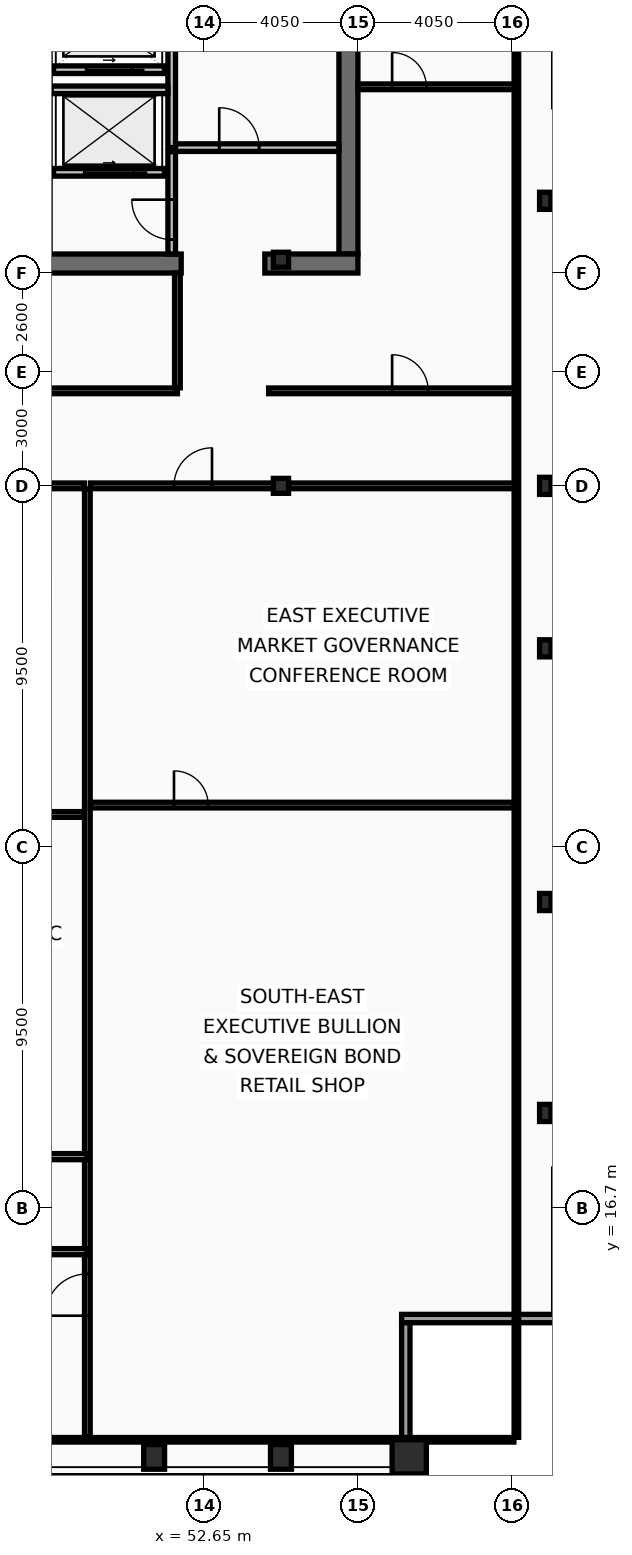
"""IFC4 building model, lengths in metres.
Left out: names, types, materials, properties, quantities, classifications, styles, units other than length and angle.
Written with IfcOpenShell. Run it as: python <this file> out.ifc"""

import sys

from ifc_helpers import new_model, si_unit, direction, frame, frame_2d, origin, origin_2d, place, context, subcontext, project, spatial, rectangle, hollow_rectangle, i_section, extrude, element, fill, save


model = new_model("IFC4")
c1 = context("Model", 3, precision=1e-05, world=origin(), true_north=direction((0.0, 1.0)))
c2 = subcontext(c1, "Body", "Model", "MODEL_VIEW")
j1 = project(units=[si_unit("LENGTHUNIT", "METRE"), si_unit("PLANEANGLEUNIT", "RADIAN")], contexts=[c1])
p1 = place(None, origin())
s1 = spatial("IfcSite", under=j1, at=p1, CompositionType="ELEMENT")
p2 = place(p1, origin())
s2 = spatial("IfcBuilding", under=s1, at=p2, CompositionType="ELEMENT")
p3 = place(p2, frame((0.0, 0.0, 343.4)))
s3 = spatial("IfcBuildingStorey", under=s2, at=p3, CompositionType="ELEMENT", Elevation=343.4)
p4 = place(p3, frame((56.45, 53.2, 0.0), z_axis=(0.0, 0.0, 1.0), x_axis=(0.0, -1.0, 0.0)))
e1 = element("IfcWall", 1, at=p4, inside=s3, PredefinedType="SHEAR", context=c2, shape_type="SweptSolid", body=[
    extrude(rectangle(XDim=11.4, YDim=0.5, at=frame_2d((5.7, 0.0))), origin(), (0.0, 0.0, 1.0), 3.44),
])
p5 = place(p3, frame((52.05, 41.55, 0.0), z_axis=(0.0, 0.0, 1.0), x_axis=(-1.0, 0.0, 0.0)))
e2 = element("IfcWall", 2, at=p5, inside=s3, PredefinedType="SHEAR", context=c2, shape_type="SweptSolid", body=[
    extrude(rectangle(XDim=11.3, YDim=0.5, at=frame_2d((5.65, 0.0))), origin(), (0.0, 0.0, 1.0), 3.44),
])
p6 = place(p3, frame((56.7, 41.55, 0.0), z_axis=(0.0, 0.0, 1.0), x_axis=(-1.0, 0.0, 0.0)))
e3 = element("IfcWall", 3, at=p6, inside=s3, PredefinedType="SHEAR", context=c2, shape_type="SweptSolid", body=[
    extrude(rectangle(XDim=2.45, YDim=0.5, at=frame_2d((1.225, 0.0))), origin(), (0.0, 0.0, 1.0), 3.44),
])
p7 = place(p3, frame((58.05, 10.15, 0.0), z_axis=(0.0, 0.0, 1.0), x_axis=(1.0, 0.0, 0.0)))
e4 = element("IfcColumn", 4, at=p7, inside=s3, PredefinedType="COLUMN", context=c2, shape_type="SweptSolid", body=[
    extrude(hollow_rectangle(XDim=0.9, YDim=0.9, WallThickness=0.05, at=origin_2d()), origin(), (0.0, 0.0, 1.0), 3.6),
])
for number, where, z_axis, x_axis in (
    (5, (51.337, 10.15, 0.0), (0.0, 0.0, 1.0), (1.0, 0.0, 0.0)),
    (6, (54.675, 10.15, 0.0), (0.0, 0.0, 1.0), (1.0, 0.0, 0.0)),
):
    element("IfcColumn", number, at=place(p3, frame(where, z_axis=z_axis, x_axis=x_axis)), inside=s3, PredefinedType="COLUMN", context=c2, shape_type="SweptSolid", body=[
        extrude(hollow_rectangle(XDim=0.55, YDim=0.65, WallThickness=0.04, at=origin_2d()), origin(), (0.0, 0.0, 1.0), 3.6),
    ])
for number, where, z_axis, x_axis in (
    (7, (61.63, 19.2, 0.0), (0.0, 0.0, 1.0), (1.0, 0.0, 0.0)),
    (8, (61.63, 24.75, 0.0), (0.0, 0.0, 1.0), (1.0, 0.0, 0.0)),
    (9, (61.63, 31.425, 0.0), (0.0, 0.0, 1.0), (1.0, 0.0, 0.0)),
    (10, (61.63, 35.7, 0.0), (0.0, 0.0, 1.0), (1.0, 0.0, 0.0)),
    (11, (61.63, 43.2, 0.0), (0.0, 0.0, 1.0), (1.0, 0.0, 0.0)),
):
    element("IfcColumn", number, at=place(p3, frame(where, z_axis=z_axis, x_axis=x_axis)), inside=s3, PredefinedType="COLUMN", context=c2, shape_type="SweptSolid", body=[
        extrude(i_section(OverallWidth=0.3, OverallDepth=0.45, WebThickness=0.014, FlangeThickness=0.026, at=origin_2d()), origin(), (0.0, 0.0, 1.0), 3.6),
    ])
for number, where, z_axis, x_axis in (
    (12, (54.675, 35.7, 0.0), (0.0, 0.0, 1.0), (1.0, 0.0, 0.0)),
    (13, (54.675, 41.65, 0.0), (0.0, 0.0, 1.0), (1.0, 0.0, 0.0)),
):
    element("IfcColumn", number, at=place(p3, frame(where, z_axis=z_axis, x_axis=x_axis)), inside=s3, PredefinedType="COLUMN", context=c2, shape_type="SweptSolid", body=[
        extrude(i_section(OverallWidth=0.399, OverallDepth=0.393, WebThickness=0.023, FlangeThickness=0.037, at=origin_2d()), origin(), (0.0, 0.0, 1.0), 3.6),
    ])
p8 = place(p3, frame((62.07, 13.79, 0.0), z_axis=(0.0, 0.0, 1.0), x_axis=(-1.0, 0.0, 0.0)))
e14 = element("IfcWall", 14, at=p8, inside=s3, PredefinedType="SOLIDWALL", context=c2, shape_type="SweptSolid", body=[
    extrude(rectangle(XDim=4.22, YDim=0.22, at=frame_2d((2.11, 0.0))), origin(), (0.0, 0.0, 1.0), 2.88),
])
p9 = place(p3, frame((57.96, 13.68, 0.0), z_axis=(0.0, 0.0, 1.0), x_axis=(0.0, -1.0, 0.0)))
e15 = element("IfcWall", 15, at=p9, inside=s3, PredefinedType="SOLIDWALL", context=c2, shape_type="SweptSolid", body=[
    extrude(rectangle(XDim=3.91, YDim=0.22, at=frame_2d((1.955, 0.0))), origin(), (0.0, 0.0, 1.0), 2.88),
])
p10 = place(p3, frame((51.61, 43.95, 0.0), z_axis=(0.0, 0.0, 1.0), x_axis=(-1.0, 0.0, 0.0)))
e16 = element("IfcWall", 16, at=p10, inside=s3, PredefinedType="PARTITIONING", context=c2, shape_type="SweptSolid", body=[
    extrude(rectangle(XDim=2.92, YDim=0.2, at=frame_2d((1.46, 0.0))), origin(), (0.0, 0.0, 1.0), 3.44),
])
p11 = place(p10, frame((0.81, 0.0, 0.0)))
e17 = element("IfcOpeningElement", 17, at=p11, cuts=e16, PredefinedType="OPENING", context=c2, shape_type="SweptSolid", body=[
    extrude(rectangle(XDim=1.3, YDim=2.18, at=frame_2d((0.65, 1.09))), frame((0.0, 0.11, 0.0), z_axis=(0.0, -1.0, 0.0), x_axis=(1.0, 0.0, 0.0)), (0.0, 0.0, 1.0), 0.22),
])
p12 = place(p3, frame((51.61, 46.65, 0.0), z_axis=(0.0, 0.0, 1.0), x_axis=(-1.0, 0.0, 0.0)))
e18 = element("IfcWall", 18, at=p12, inside=s3, PredefinedType="PARTITIONING", context=c2, shape_type="SweptSolid", body=[
    extrude(rectangle(XDim=2.92, YDim=0.2, at=frame_2d((1.46, 0.0))), origin(), (0.0, 0.0, 1.0), 3.44),
])
p13 = place(p12, frame((0.86, 0.0, 0.0)))
e19 = element("IfcOpeningElement", 19, at=p13, cuts=e18, PredefinedType="OPENING", context=c2, shape_type="SweptSolid", body=[
    extrude(rectangle(XDim=1.2, YDim=2.18, at=frame_2d((0.6, 1.09))), frame((0.0, 0.11, 0.0), z_axis=(0.0, -1.0, 0.0), x_axis=(1.0, 0.0, 0.0)), (0.0, 0.0, 1.0), 0.22),
])
p14 = place(p3, frame((51.8, 44.6, 0.0), z_axis=(0.0, 0.0, 1.0), x_axis=(0.0, 1.0, 0.0)))
e20 = element("IfcWall", 20, at=p14, inside=s3, PredefinedType="PARTITIONING", context=c2, shape_type="SweptSolid", body=[
    extrude(rectangle(XDim=4.3, YDim=0.2, at=frame_2d((2.15, 0.0))), origin(), (0.0, 0.0, 1.0), 3.44),
])
p15 = place(p3, frame((51.9, 44.6, 0.0), z_axis=(0.0, 0.0, 1.0), x_axis=(1.0, 0.0, 0.0)))
e21 = element("IfcWall", 21, at=p15, inside=s3, PredefinedType="PARTITIONING", context=c2, shape_type="SweptSolid", body=[
    extrude(rectangle(XDim=4.3, YDim=0.2, at=frame_2d((2.15, 0.0))), origin(), (0.0, 0.0, 1.0), 3.44),
])
p16 = place(p15, frame((1.15, 0.0, 0.0)))
e22 = element("IfcOpeningElement", 22, at=p16, cuts=e21, PredefinedType="OPENING", context=c2, shape_type="SweptSolid", body=[
    extrude(rectangle(XDim=1.05, YDim=2.15, at=frame_2d((0.525, 1.075))), frame((0.0, 0.11, 0.0), z_axis=(0.0, -1.0, 0.0), x_axis=(1.0, 0.0, 0.0)), (0.0, 0.0, 1.0), 0.22),
])
p17 = place(p3, frame((48.63, 46.12, 0.0), z_axis=(0.0, 0.0, 1.0), x_axis=(1.0, 0.0, 0.0)))
e23 = element("IfcWall", 23, at=p17, inside=s3, PredefinedType="PARTITIONING", context=c2, shape_type="SweptSolid", body=[
    extrude(rectangle(XDim=3.07, YDim=0.2, at=frame_2d((1.535, 0.0))), origin(), (0.0, 0.0, 1.0), 3.44),
])
p18 = place(p3, frame((51.8, 41.8, 0.0), z_axis=(0.0, 0.0, 1.0), x_axis=(0.0, 1.0, 0.0)))
e24 = element("IfcWall", 24, at=p18, inside=s3, PredefinedType="PARTITIONING", context=c2, shape_type="SweptSolid", body=[
    extrude(rectangle(XDim=2.695, YDim=0.2, at=frame_2d((1.348, 0.0))), origin(), (0.0, 0.0, 1.0), 3.44),
])
p19 = place(p18, frame((0.38, 0.0, 0.0)))
e25 = element("IfcOpeningElement", 25, at=p19, cuts=e24, PredefinedType="OPENING", context=c2, shape_type="SweptSolid", body=[
    extrude(rectangle(XDim=1.05, YDim=2.15, at=frame_2d((0.525, 1.075))), frame((0.0, 0.11, 0.0), z_axis=(0.0, -1.0, 0.0), x_axis=(1.0, 0.0, 0.0)), (0.0, 0.0, 1.0), 0.22),
])
p20 = place(p3, frame((45.55, 38.2, 0.0), z_axis=(0.0, 0.0, 1.0), x_axis=(1.0, 0.0, 0.0)))
e26 = element("IfcWall", 26, at=p20, inside=s3, PredefinedType="PARTITIONING", context=c2, shape_type="SweptSolid", body=[
    extrude(rectangle(XDim=6.4, YDim=0.15, at=frame_2d((3.2, 0.0))), origin(), (0.0, 0.0, 1.0), 2.83),
])
p21 = place(p20, frame((1.1, 0.0, 0.0)))
e27 = element("IfcOpeningElement", 27, at=p21, cuts=e26, PredefinedType="OPENING", context=c2, shape_type="SweptSolid", body=[
    extrude(rectangle(XDim=1.0, YDim=2.05, at=frame_2d((0.5, 1.025))), frame((0.0, 0.085, 0.0), z_axis=(0.0, -1.0, 0.0), x_axis=(1.0, 0.0, 0.0)), (0.0, 0.0, 1.0), 0.17),
])
p22 = place(p3, frame((51.95, 38.28, 0.0), z_axis=(0.0, 0.0, 1.0), x_axis=(0.0, 1.0, 0.0)))
e28 = element("IfcWall", 28, at=p22, inside=s3, PredefinedType="PARTITIONING", context=c2, shape_type="SweptSolid", body=[
    extrude(rectangle(XDim=3.02, YDim=0.15, at=frame_2d((1.51, 0.0))), origin(), (0.0, 0.0, 1.0), 3.44),
])
p23 = place(p3, frame((54.35, 38.2, 0.0), z_axis=(0.0, 0.0, 1.0), x_axis=(1.0, 0.0, 0.0)))
e29 = element("IfcWall", 29, at=p23, inside=s3, PredefinedType="PARTITIONING", context=c2, shape_type="SweptSolid", body=[
    extrude(rectangle(XDim=6.52, YDim=0.15, at=frame_2d((3.26, 0.0))), origin(), (0.0, 0.0, 1.0), 2.83),
])
p24 = place(p23, frame((3.25, 0.0, 0.0)))
e30 = element("IfcOpeningElement", 30, at=p24, cuts=e29, PredefinedType="OPENING", context=c2, shape_type="SweptSolid", body=[
    extrude(rectangle(XDim=0.95, YDim=2.05, at=frame_2d((0.475, 1.025))), frame((0.0, 0.085, 0.0), z_axis=(0.0, -1.0, 0.0), x_axis=(1.0, 0.0, 0.0)), (0.0, 0.0, 1.0), 0.17),
])
p25 = place(p3, frame((56.7, 46.2, 0.0), z_axis=(0.0, 0.0, 1.0), x_axis=(1.0, 0.0, 0.0)))
e31 = element("IfcWall", 31, at=p25, inside=s3, PredefinedType="PARTITIONING", context=c2, shape_type="SweptSolid", body=[
    extrude(rectangle(XDim=4.105, YDim=0.15, at=frame_2d((2.052, 0.0))), origin(), (0.0, 0.0, 1.0), 2.88),
])
p26 = place(p25, frame((0.9, 0.0, 0.0)))
e32 = element("IfcOpeningElement", 32, at=p26, cuts=e31, PredefinedType="OPENING", context=c2, shape_type="SweptSolid", body=[
    extrude(rectangle(XDim=0.9, YDim=2.05, at=frame_2d((0.45, 1.025))), frame((0.0, 0.085, 0.0), z_axis=(0.0, -1.0, 0.0), x_axis=(1.0, 0.0, 0.0)), (0.0, 0.0, 1.0), 0.17),
])
p27 = place(p3, frame((49.58, 10.665, 0.0), z_axis=(0.0, 0.0, 1.0), x_axis=(0.0, 1.0, 0.0)))
e33 = element("IfcWall", 33, at=p27, inside=s3, PredefinedType="PARTITIONING", context=c2, shape_type="SweptSolid", body=[
    extrude(rectangle(XDim=24.955, YDim=0.15, at=frame_2d((12.478, 0.0))), origin(), (0.0, 0.0, 1.0), 3.07),
])
p28 = place(p27, frame((3.2, 0.0, 0.0)))
e34 = element("IfcOpeningElement", 34, at=p28, cuts=e33, PredefinedType="OPENING", context=c2, shape_type="SweptSolid", body=[
    extrude(rectangle(XDim=1.1, YDim=2.1, at=frame_2d((0.55, 1.05))), frame((0.0, 0.085, 0.0), z_axis=(0.0, -1.0, 0.0), x_axis=(1.0, 0.0, 0.0)), (0.0, 0.0, 1.0), 0.17),
])
p29 = place(p3, frame((24.48, 35.7, 0.0), z_axis=(0.0, 0.0, 1.0), x_axis=(1.0, 0.0, 0.0)))
e35 = element("IfcWall", 35, at=p29, inside=s3, PredefinedType="PARTITIONING", context=c2, shape_type="SweptSolid", body=[
    extrude(rectangle(XDim=25.02, YDim=0.15, at=frame_2d((12.51, 0.0))), origin(), (0.0, 0.0, 1.0), 2.83),
])
p30 = place(p3, frame((49.66, 35.7, 0.0), z_axis=(0.0, 0.0, 1.0), x_axis=(1.0, 0.0, 0.0)))
e36 = element("IfcWall", 36, at=p30, inside=s3, PredefinedType="PARTITIONING", context=c2, shape_type="SweptSolid", body=[
    extrude(rectangle(XDim=11.145, YDim=0.15, at=frame_2d((5.573, 0.0))), origin(), (0.0, 0.0, 1.0), 2.83),
])
p31 = place(p30, frame((2.2, 0.0, 0.0)))
e37 = element("IfcOpeningElement", 37, at=p31, cuts=e36, PredefinedType="OPENING", context=c2, shape_type="SweptSolid", body=[
    extrude(rectangle(XDim=1.0, YDim=2.05, at=frame_2d((0.5, 1.025))), frame((0.0, 0.085, 0.0), z_axis=(0.0, -1.0, 0.0), x_axis=(1.0, 0.0, 0.0)), (0.0, 0.0, 1.0), 0.17),
])
p32 = place(p3, frame((49.66, 27.3, 0.0), z_axis=(0.0, 0.0, 1.0), x_axis=(1.0, 0.0, 0.0)))
e38 = element("IfcWall", 38, at=p32, inside=s3, PredefinedType="PARTITIONING", context=c2, shape_type="SweptSolid", body=[
    extrude(rectangle(XDim=11.145, YDim=0.15, at=frame_2d((5.573, 0.0))), origin(), (0.0, 0.0, 1.0), 2.83),
])
p33 = place(p32, frame((2.2, 0.0, 0.0)))
e39 = element("IfcOpeningElement", 39, at=p33, cuts=e38, PredefinedType="OPENING", context=c2, shape_type="SweptSolid", body=[
    extrude(rectangle(XDim=0.9, YDim=2.05, at=frame_2d((0.45, 1.025))), frame((0.0, 0.085, 0.0), z_axis=(0.0, -1.0, 0.0), x_axis=(1.0, 0.0, 0.0)), (0.0, 0.0, 1.0), 0.17),
])
p34 = place(p3, frame((43.956, 18.05, 0.0), z_axis=(0.0, 0.0, 1.0), x_axis=(1.0, 0.0, 0.0)))
e40 = element("IfcWall", 40, at=p34, inside=s3, PredefinedType="PARTITIONING", context=c2, shape_type="SweptSolid", body=[
    extrude(rectangle(XDim=5.624, YDim=0.16, at=frame_2d((2.812, 0.0))), origin(), (0.0, 0.0, 1.0), 2.83),
])
p35 = place(p34, frame((2.862, 0.0, 0.0)))
e41 = element("IfcOpeningElement", 41, at=p35, cuts=e40, PredefinedType="OPENING", context=c2, shape_type="SweptSolid", body=[
    extrude(rectangle(XDim=1.0, YDim=2.05, at=frame_2d((0.5, 1.025))), frame((0.0, 0.09, 0.0), z_axis=(0.0, -1.0, 0.0), x_axis=(1.0, 0.0, 0.0)), (0.0, 0.0, 1.0), 0.18),
])
p36 = place(p3, frame((44.036, 27.054, 0.0), z_axis=(0.0, 0.0, 1.0), x_axis=(1.0, 0.0, 0.0)))
e42 = element("IfcWall", 42, at=p36, inside=s3, PredefinedType="PARTITIONING", context=c2, shape_type="SweptSolid", body=[
    extrude(rectangle(XDim=5.464, YDim=0.15, at=frame_2d((2.732, 0.0))), origin(), (0.0, 0.0, 1.0), 2.83),
])
p37 = place(p36, frame((2.531, 0.0, 0.0)))
e43 = element("IfcOpeningElement", 43, at=p37, cuts=e42, PredefinedType="OPENING", context=c2, shape_type="SweptSolid", body=[
    extrude(rectangle(XDim=0.9, YDim=2.05, at=frame_2d((0.45, 1.025))), frame((0.0, 0.085, 0.0), z_axis=(0.0, -1.0, 0.0), x_axis=(1.0, 0.0, 0.0)), (0.0, 0.0, 1.0), 0.17),
])
p38 = place(p3, frame((36.532, 15.55, 0.0), z_axis=(0.0, 0.0, 1.0), x_axis=(1.0, 0.0, 0.0)))
e44 = element("IfcWall", 44, at=p38, inside=s3, PredefinedType="PARTITIONING", context=c2, shape_type="SweptSolid", body=[
    extrude(rectangle(XDim=13.048, YDim=0.16, at=frame_2d((6.524, 0.0))), origin(), (0.0, 0.0, 1.0), 2.83),
])
p39 = place(p38, frame((5.98, 0.0, 0.0)))
e45 = element("IfcOpeningElement", 45, at=p39, cuts=e44, PredefinedType="OPENING", context=c2, shape_type="SweptSolid", body=[
    extrude(rectangle(XDim=1.0, YDim=2.05, at=frame_2d((0.5, 1.025))), frame((0.0, 0.09, 0.0), z_axis=(0.0, -1.0, 0.0), x_axis=(1.0, 0.0, 0.0)), (0.0, 0.0, 1.0), 0.18),
])
p40 = place(p3, frame((60.87, 10.665, 0.0), z_axis=(0.0, 0.0, 1.0), x_axis=(0.0, 1.0, 0.0)))
e46 = element("IfcWall", 46, at=p40, inside=s3, PredefinedType="PARTITIONING", context=c2, shape_type="SweptSolid", body=[
    extrude(rectangle(XDim=42.11, YDim=0.12, at=frame_2d((21.055, 0.0))), origin(), (0.0, 0.0, 1.0), 2.83),
])
p41 = place(p3, frame((12.095, 10.6, 0.0), z_axis=(0.0, 0.0, 1.0), x_axis=(1.0, 0.0, 0.0)))
e47 = element("IfcWall", 47, at=p41, inside=s3, PredefinedType="PARTITIONING", context=c2, shape_type="SweptSolid", body=[
    extrude(rectangle(XDim=48.71, YDim=0.12, at=frame_2d((24.355, 0.0))), origin(), (0.0, 0.0, 1.0), 2.83),
])
p42 = place(p11, origin())
e48 = element("IfcDoor", 48, at=p42, inside=s3, OperationType="SLIDING_TO_LEFT", PredefinedType="DOOR", context=c2, shape_type="SweptSolid", body=[
    extrude(rectangle(XDim=1.3, YDim=2.18, at=frame_2d((0.65, 1.09))), frame((0.0, 0.025, 0.0), z_axis=(0.0, -1.0, 0.0), x_axis=(1.0, 0.0, 0.0)), (0.0, 0.0, 1.0), 0.05),
])
fill(e17, e48)
p43 = place(p13, origin())
e49 = element("IfcDoor", 49, at=p43, inside=s3, OperationType="SLIDING_TO_LEFT", PredefinedType="DOOR", context=c2, shape_type="SweptSolid", body=[
    extrude(rectangle(XDim=1.2, YDim=2.18, at=frame_2d((0.6, 1.09))), frame((0.0, 0.025, 0.0), z_axis=(0.0, -1.0, 0.0), x_axis=(1.0, 0.0, 0.0)), (0.0, 0.0, 1.0), 0.05),
])
fill(e19, e49)
p44 = place(p16, origin())
e50 = element("IfcDoor", 50, at=p44, inside=s3, OperationType="SINGLE_SWING_LEFT", PredefinedType="DOOR", context=c2, shape_type="SweptSolid", body=[
    extrude(rectangle(XDim=1.05, YDim=2.15, at=frame_2d((0.525, 1.075))), frame((0.0, 0.025, 0.0), z_axis=(0.0, -1.0, 0.0), x_axis=(1.0, 0.0, 0.0)), (0.0, 0.0, 1.0), 0.05),
])
fill(e22, e50)
p45 = place(p19, origin())
e51 = element("IfcDoor", 51, at=p45, inside=s3, OperationType="SINGLE_SWING_RIGHT", PredefinedType="DOOR", context=c2, shape_type="SweptSolid", body=[
    extrude(rectangle(XDim=1.05, YDim=2.15, at=frame_2d((0.525, 1.075))), frame((0.0, 0.025, 0.0), z_axis=(0.0, -1.0, 0.0), x_axis=(1.0, 0.0, 0.0)), (0.0, 0.0, 1.0), 0.05),
])
fill(e25, e51)
p46 = place(p24, origin())
e52 = element("IfcDoor", 52, at=p46, inside=s3, OperationType="SINGLE_SWING_LEFT", PredefinedType="DOOR", context=c2, shape_type="SweptSolid", body=[
    extrude(rectangle(XDim=0.95, YDim=2.05, at=frame_2d((0.475, 1.025))), frame((0.0, 0.025, 0.0), z_axis=(0.0, -1.0, 0.0), x_axis=(1.0, 0.0, 0.0)), (0.0, 0.0, 1.0), 0.05),
])
fill(e30, e52)
p47 = place(p26, origin())
e53 = element("IfcDoor", 53, at=p47, inside=s3, OperationType="SINGLE_SWING_LEFT", PredefinedType="DOOR", context=c2, shape_type="SweptSolid", body=[
    extrude(rectangle(XDim=0.9, YDim=2.05, at=frame_2d((0.45, 1.025))), frame((0.0, 0.025, 0.0), z_axis=(0.0, -1.0, 0.0), x_axis=(1.0, 0.0, 0.0)), (0.0, 0.0, 1.0), 0.05),
])
fill(e32, e53)
p48 = place(p28, origin())
e54 = element("IfcDoor", 54, at=p48, inside=s3, OperationType="SINGLE_SWING_LEFT", PredefinedType="DOOR", context=c2, shape_type="SweptSolid", body=[
    extrude(rectangle(XDim=1.1, YDim=2.1, at=frame_2d((0.55, 1.05))), frame((0.0, 0.025, 0.0), z_axis=(0.0, -1.0, 0.0), x_axis=(1.0, 0.0, 0.0)), (0.0, 0.0, 1.0), 0.05),
])
fill(e34, e54)
p49 = place(p31, origin())
e55 = element("IfcDoor", 55, at=p49, inside=s3, OperationType="SINGLE_SWING_RIGHT", PredefinedType="DOOR", context=c2, shape_type="SweptSolid", body=[
    extrude(rectangle(XDim=1.0, YDim=2.05, at=frame_2d((0.5, 1.025))), frame((0.0, 0.025, 0.0), z_axis=(0.0, -1.0, 0.0), x_axis=(1.0, 0.0, 0.0)), (0.0, 0.0, 1.0), 0.05),
])
fill(e37, e55)
p50 = place(p33, origin())
e56 = element("IfcDoor", 56, at=p50, inside=s3, OperationType="SINGLE_SWING_LEFT", PredefinedType="DOOR", context=c2, shape_type="SweptSolid", body=[
    extrude(rectangle(XDim=0.9, YDim=2.05, at=frame_2d((0.45, 1.025))), frame((0.0, 0.025, 0.0), z_axis=(0.0, -1.0, 0.0), x_axis=(1.0, 0.0, 0.0)), (0.0, 0.0, 1.0), 0.05),
])
fill(e39, e56)
save(model, sys.argv[1])
